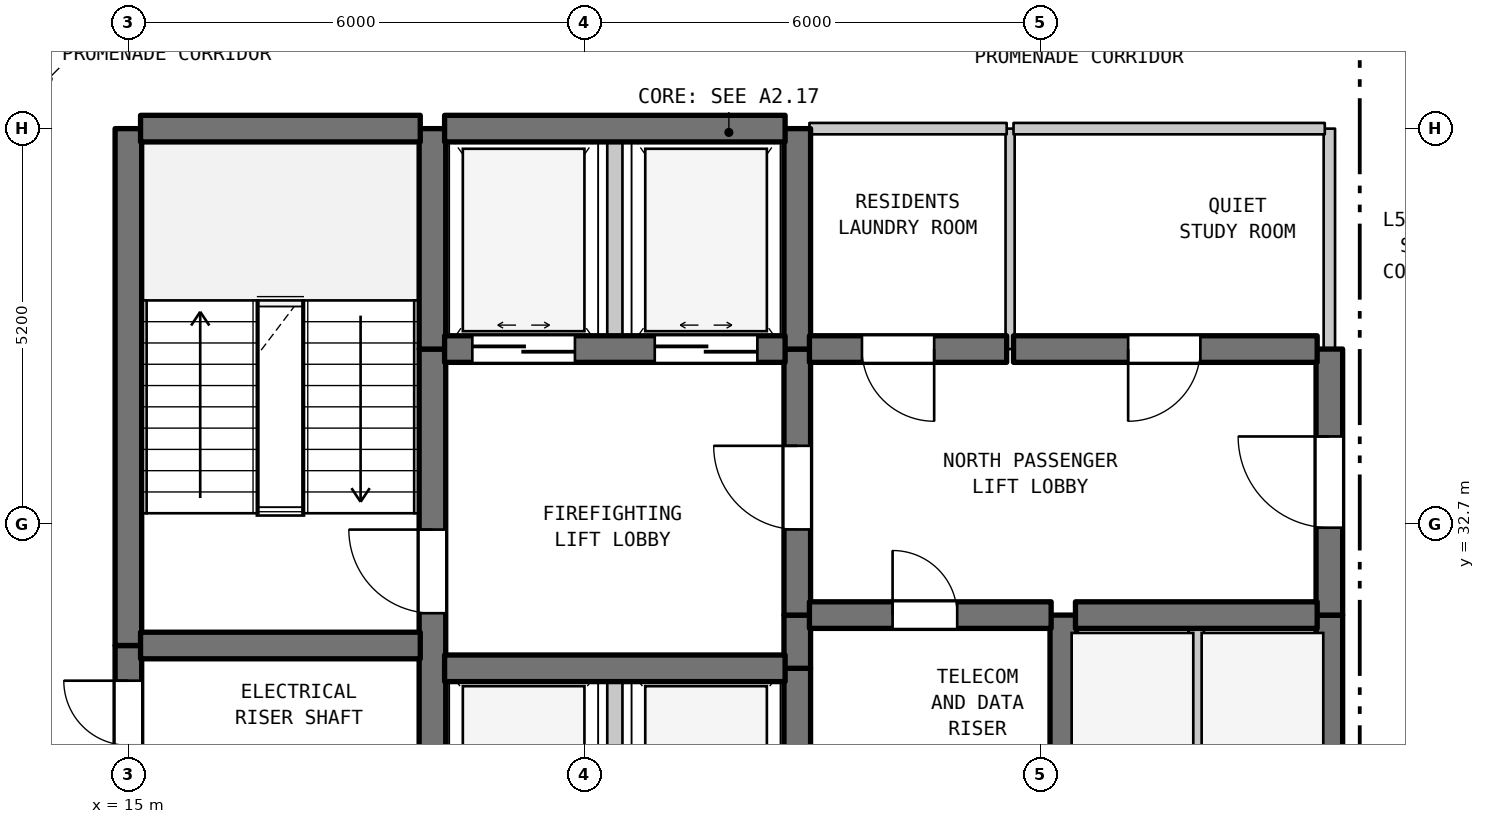
"""IFC4 building model, lengths in metres.
Left out: names, types, materials, properties, quantities, classifications, styles, units other than length and angle.
Written with IfcOpenShell. Run it as: python <this file> out.ifc"""

import sys

from ifc_helpers import new_model, si_unit, direction, frame, frame_2d, origin, place, context, subcontext, project, spatial, rectangle, extrude, element, fill, save


model = new_model("IFC4")
c1 = context("Model", 3, precision=1e-05, world=origin(), true_north=direction((0.0, 1.0)))
c2 = subcontext(c1, "Body", "Model", "MODEL_VIEW")
j1 = project(units=[si_unit("LENGTHUNIT", "METRE"), si_unit("PLANEANGLEUNIT", "RADIAN")], contexts=[c1])
p1 = place(None, origin())
s1 = spatial("IfcSite", under=j1, at=p1, CompositionType="ELEMENT")
p2 = place(p1, origin())
s2 = spatial("IfcBuilding", under=s1, at=p2, CompositionType="ELEMENT")
p3 = place(p2, frame((0.0, 0.0, 214.3)))
s3 = spatial("IfcBuildingStorey", under=s2, at=p3, CompositionType="ELEMENT", Elevation=214.3)
p4 = place(p3, frame((15.0, 29.5, 0.0), z_axis=(0.0, 0.0, 1.0), x_axis=(0.0, 1.0, 0.0)))
e1 = element("IfcWall", 1, at=p4, inside=s3, PredefinedType="SHEAR", context=c2, shape_type="SweptSolid", body=[
    extrude(rectangle(XDim=1.6, YDim=0.35, at=frame_2d((0.8, 0.0))), origin(), (0.0, 0.0, 1.0), 3.38),
])
p5 = place(p4, frame((0.287, 0.0, 0.0)))
e2 = element("IfcOpeningElement", 2, at=p5, cuts=e1, PredefinedType="OPENING", context=c2, shape_type="SweptSolid", body=[
    extrude(rectangle(XDim=0.85, YDim=2.1, at=frame_2d((0.425, 1.05))), frame((0.0, 0.185, 0.0), z_axis=(0.0, -1.0, 0.0), x_axis=(1.0, 0.0, 0.0)), (0.0, 0.0, 1.0), 0.37),
])
p6 = place(p3, frame((15.0, 31.1, 0.0), z_axis=(0.0, 0.0, 1.0), x_axis=(0.0, 1.0, 0.0)))
e3 = element("IfcWall", 3, at=p6, inside=s3, PredefinedType="SHEAR", context=c2, shape_type="SweptSolid", body=[
    extrude(rectangle(XDim=6.8, YDim=0.35, at=frame_2d((3.4, 0.0))), origin(), (0.0, 0.0, 1.0), 3.38),
])
p7 = place(p3, frame((19.0, 29.5, 0.0), z_axis=(0.0, 0.0, 1.0), x_axis=(0.0, 1.0, 0.0)))
e4 = element("IfcWall", 4, at=p7, inside=s3, PredefinedType="SHEAR", context=c2, shape_type="SweptSolid", body=[
    extrude(rectangle(XDim=5.5, YDim=0.35, at=frame_2d((2.75, 0.0))), origin(), (0.0, 0.0, 1.0), 3.38),
])
p8 = place(p7, frame((2.025, 0.0, 0.0)))
e5 = element("IfcOpeningElement", 5, at=p8, cuts=e4, PredefinedType="OPENING", context=c2, shape_type="SweptSolid", body=[
    extrude(rectangle(XDim=1.1, YDim=2.15, at=frame_2d((0.55, 1.075))), frame((0.0, 0.185, 0.0), z_axis=(0.0, -1.0, 0.0), x_axis=(1.0, 0.0, 0.0)), (0.0, 0.0, 1.0), 0.37),
])
p9 = place(p3, frame((19.0, 35.0, 0.0), z_axis=(0.0, 0.0, 1.0), x_axis=(0.0, 1.0, 0.0)))
e6 = element("IfcWall", 6, at=p9, inside=s3, PredefinedType="SHEAR", context=c2, shape_type="SweptSolid", body=[
    extrude(rectangle(XDim=2.9, YDim=0.35, at=frame_2d((1.45, 0.0))), origin(), (0.0, 0.0, 1.0), 3.38),
])
p10 = place(p3, frame((21.4, 28.2, 0.0), z_axis=(0.0, 0.0, 1.0), x_axis=(0.0, 1.0, 0.0)))
e7 = element("IfcWall", 7, at=p10, inside=s3, PredefinedType="STANDARD", context=c2, shape_type="SweptSolid", body=[
    extrude(rectangle(XDim=2.6, YDim=0.2, at=frame_2d((1.3, 0.0))), origin(), (0.0, 0.0, 1.0), 3.38),
])
p11 = place(p3, frame((21.4, 35.0, 0.0), z_axis=(0.0, 0.0, 1.0), x_axis=(0.0, 1.0, 0.0)))
e8 = element("IfcWall", 8, at=p11, inside=s3, PredefinedType="STANDARD", context=c2, shape_type="SweptSolid", body=[
    extrude(rectangle(XDim=2.9, YDim=0.2, at=frame_2d((1.45, 0.0))), origin(), (0.0, 0.0, 1.0), 3.38),
])
p12 = place(p3, frame((23.8, 29.5, 0.0), z_axis=(0.0, 0.0, 1.0), x_axis=(0.0, 1.0, 0.0)))
e9 = element("IfcWall", 9, at=p12, inside=s3, PredefinedType="SHEAR", context=c2, shape_type="SweptSolid", body=[
    extrude(rectangle(XDim=1.3, YDim=0.35, at=frame_2d((0.65, 0.0))), origin(), (0.0, 0.0, 1.0), 3.38),
])
p13 = place(p3, frame((23.8, 30.8, 0.0), z_axis=(0.0, 0.0, 1.0), x_axis=(0.0, 1.0, 0.0)))
e10 = element("IfcWall", 10, at=p13, inside=s3, PredefinedType="SHEAR", context=c2, shape_type="SweptSolid", body=[
    extrude(rectangle(XDim=0.7, YDim=0.35, at=frame_2d((0.35, 0.0))), origin(), (0.0, 0.0, 1.0), 3.38),
])
p14 = place(p3, frame((23.8, 31.5, 0.0), z_axis=(0.0, 0.0, 1.0), x_axis=(0.0, 1.0, 0.0)))
e11 = element("IfcWall", 11, at=p14, inside=s3, PredefinedType="SHEAR", context=c2, shape_type="SweptSolid", body=[
    extrude(rectangle(XDim=3.5, YDim=0.35, at=frame_2d((1.75, 0.0))), origin(), (0.0, 0.0, 1.0), 3.38),
])
p15 = place(p14, frame((1.127, 0.0, 0.0)))
e12 = element("IfcOpeningElement", 12, at=p15, cuts=e11, PredefinedType="OPENING", context=c2, shape_type="SweptSolid", body=[
    extrude(rectangle(XDim=1.1, YDim=2.15, at=frame_2d((0.55, 1.075))), frame((0.0, 0.185, 0.0), z_axis=(0.0, -1.0, 0.0), x_axis=(1.0, 0.0, 0.0)), (0.0, 0.0, 1.0), 0.37),
])
p16 = place(p3, frame((23.8, 35.0, 0.0), z_axis=(0.0, 0.0, 1.0), x_axis=(0.0, 1.0, 0.0)))
e13 = element("IfcWall", 13, at=p16, inside=s3, PredefinedType="SHEAR", context=c2, shape_type="SweptSolid", body=[
    extrude(rectangle(XDim=2.9, YDim=0.35, at=frame_2d((1.45, 0.0))), origin(), (0.0, 0.0, 1.0), 3.38),
])
p17 = place(p3, frame((26.6, 35.0, 0.0), z_axis=(0.0, 0.0, 1.0), x_axis=(0.0, 1.0, 0.0)))
e14 = element("IfcWall", 14, at=p17, inside=s3, PredefinedType="PARTITIONING", context=c2, shape_type="SweptSolid", body=[
    extrude(rectangle(XDim=2.9, YDim=0.12, at=frame_2d((1.45, 0.0))), origin(), (0.0, 0.0, 1.0), 3.38),
])
p18 = place(p3, frame((27.3, 29.5, 0.0), z_axis=(0.0, 0.0, 1.0), x_axis=(0.0, 1.0, 0.0)))
e15 = element("IfcWall", 15, at=p18, inside=s3, PredefinedType="SHEAR", context=c2, shape_type="SweptSolid", body=[
    extrude(rectangle(XDim=2.0, YDim=0.35, at=frame_2d((1.0, 0.0))), origin(), (0.0, 0.0, 1.0), 3.38),
])
p19 = place(p3, frame((29.05, 28.9, 0.0), z_axis=(0.0, 0.0, 1.0), x_axis=(0.0, 1.0, 0.0)))
e16 = element("IfcWall", 16, at=p19, inside=s3, PredefinedType="STANDARD", context=c2, shape_type="SweptSolid", body=[
    extrude(rectangle(XDim=2.6, YDim=0.2, at=frame_2d((1.3, 0.0))), origin(), (0.0, 0.0, 1.0), 3.38),
])
p20 = place(p3, frame((30.8, 28.9, 0.0), z_axis=(0.0, 0.0, 1.0), x_axis=(0.0, 1.0, 0.0)))
e17 = element("IfcWall", 17, at=p20, inside=s3, PredefinedType="SHEAR", context=c2, shape_type="SweptSolid", body=[
    extrude(rectangle(XDim=2.6, YDim=0.35, at=frame_2d((1.3, 0.0))), origin(), (0.0, 0.0, 1.0), 3.38),
])
p21 = place(p3, frame((30.8, 31.5, 0.0), z_axis=(0.0, 0.0, 1.0), x_axis=(0.0, 1.0, 0.0)))
e18 = element("IfcWall", 18, at=p21, inside=s3, PredefinedType="SHEAR", context=c2, shape_type="SweptSolid", body=[
    extrude(rectangle(XDim=3.5, YDim=0.35, at=frame_2d((1.75, 0.0))), origin(), (0.0, 0.0, 1.0), 3.38),
])
p22 = place(p21, frame((1.15, 0.0, 0.0)))
e19 = element("IfcOpeningElement", 19, at=p22, cuts=e18, PredefinedType="OPENING", context=c2, shape_type="SweptSolid", body=[
    extrude(rectangle(XDim=1.2, YDim=2.2, at=frame_2d((0.6, 1.1))), frame((0.0, 0.185, 0.0), z_axis=(0.0, -1.0, 0.0), x_axis=(1.0, 0.0, 0.0)), (0.0, 0.0, 1.0), 0.37),
])
p23 = place(p3, frame((30.8, 35.0, 0.0), z_axis=(0.0, 0.0, 1.0), x_axis=(0.0, 1.0, 0.0)))
e20 = element("IfcWall", 20, at=p23, inside=s3, PredefinedType="STANDARD", context=c2, shape_type="SweptSolid", body=[
    extrude(rectangle(XDim=2.9, YDim=0.15, at=frame_2d((1.45, 0.0))), origin(), (0.0, 0.0, 1.0), 3.38),
])
p24 = place(p3, frame((19.16, 30.8, 0.0), z_axis=(0.0, 0.0, 1.0), x_axis=(1.0, 0.0, 0.0)))
e21 = element("IfcWall", 21, at=p24, inside=s3, PredefinedType="SHEAR", context=c2, shape_type="SweptSolid", body=[
    extrude(rectangle(XDim=4.48, YDim=0.35, at=frame_2d((2.24, 0.0))), origin(), (0.0, 0.0, 1.0), 3.38),
])
p25 = place(p3, frame((15.16, 31.1, 0.0), z_axis=(0.0, 0.0, 1.0), x_axis=(1.0, 0.0, 0.0)))
e22 = element("IfcWall", 22, at=p25, inside=s3, PredefinedType="SHEAR", context=c2, shape_type="SweptSolid", body=[
    extrude(rectangle(XDim=3.68, YDim=0.35, at=frame_2d((1.84, 0.0))), origin(), (0.0, 0.0, 1.0), 3.38),
])
p26 = place(p3, frame((23.96, 31.5, 0.0), z_axis=(0.0, 0.0, 1.0), x_axis=(1.0, 0.0, 0.0)))
e23 = element("IfcWall", 23, at=p26, inside=s3, PredefinedType="SHEAR", context=c2, shape_type="SweptSolid", body=[
    extrude(rectangle(XDim=3.18, YDim=0.35, at=frame_2d((1.59, 0.0))), origin(), (0.0, 0.0, 1.0), 3.38),
])
p27 = place(p26, frame((1.094, 0.0, 0.0)))
e24 = element("IfcOpeningElement", 24, at=p27, cuts=e23, PredefinedType="OPENING", context=c2, shape_type="SweptSolid", body=[
    extrude(rectangle(XDim=0.85, YDim=2.1, at=frame_2d((0.425, 1.05))), frame((0.0, 0.185, 0.0), z_axis=(0.0, -1.0, 0.0), x_axis=(1.0, 0.0, 0.0)), (0.0, 0.0, 1.0), 0.37),
])
p28 = place(p3, frame((27.46, 31.5, 0.0), z_axis=(0.0, 0.0, 1.0), x_axis=(1.0, 0.0, 0.0)))
e25 = element("IfcWall", 25, at=p28, inside=s3, PredefinedType="SHEAR", context=c2, shape_type="SweptSolid", body=[
    extrude(rectangle(XDim=3.18, YDim=0.35, at=frame_2d((1.59, 0.0))), origin(), (0.0, 0.0, 1.0), 3.38),
])
p29 = place(p3, frame((19.16, 35.0, 0.0), z_axis=(0.0, 0.0, 1.0), x_axis=(1.0, 0.0, 0.0)))
e26 = element("IfcWall", 26, at=p29, inside=s3, PredefinedType="SHEAR", context=c2, shape_type="SweptSolid", body=[
    extrude(rectangle(XDim=4.48, YDim=0.35, at=frame_2d((2.24, 0.0))), origin(), (0.0, 0.0, 1.0), 3.38),
])
p30 = place(p29, frame((0.365, 0.0, 0.0)))
e27 = element("IfcOpeningElement", 27, at=p30, cuts=e26, PredefinedType="OPENING", context=c2, shape_type="SweptSolid", body=[
    extrude(rectangle(XDim=1.35, YDim=2.2, at=frame_2d((0.675, 1.1))), frame((0.0, 0.185, 0.0), z_axis=(0.0, -1.0, 0.0), x_axis=(1.0, 0.0, 0.0)), (0.0, 0.0, 1.0), 0.37),
])
p31 = place(p29, frame((2.765, 0.0, 0.0)))
e28 = element("IfcOpeningElement", 28, at=p31, cuts=e26, PredefinedType="OPENING", context=c2, shape_type="SweptSolid", body=[
    extrude(rectangle(XDim=1.35, YDim=2.2, at=frame_2d((0.675, 1.1))), frame((0.0, 0.185, 0.0), z_axis=(0.0, -1.0, 0.0), x_axis=(1.0, 0.0, 0.0)), (0.0, 0.0, 1.0), 0.37),
])
p32 = place(p3, frame((23.96, 35.0, 0.0), z_axis=(0.0, 0.0, 1.0), x_axis=(1.0, 0.0, 0.0)))
e29 = element("IfcWall", 29, at=p32, inside=s3, PredefinedType="SHEAR", context=c2, shape_type="SweptSolid", body=[
    extrude(rectangle(XDim=2.595, YDim=0.35, at=frame_2d((1.297, 0.0))), origin(), (0.0, 0.0, 1.0), 3.38),
])
p33 = place(p32, frame((0.691, 0.0, 0.0)))
e30 = element("IfcOpeningElement", 30, at=p33, cuts=e29, PredefinedType="OPENING", context=c2, shape_type="SweptSolid", body=[
    extrude(rectangle(XDim=0.95, YDim=2.15, at=frame_2d((0.475, 1.075))), frame((0.0, 0.185, 0.0), z_axis=(0.0, -1.0, 0.0), x_axis=(1.0, 0.0, 0.0)), (0.0, 0.0, 1.0), 0.37),
])
p34 = place(p3, frame((26.645, 35.0, 0.0), z_axis=(0.0, 0.0, 1.0), x_axis=(1.0, 0.0, 0.0)))
e31 = element("IfcWall", 31, at=p34, inside=s3, PredefinedType="SHEAR", context=c2, shape_type="SweptSolid", body=[
    extrude(rectangle(XDim=3.995, YDim=0.35, at=frame_2d((1.998, 0.0))), origin(), (0.0, 0.0, 1.0), 3.38),
])
p35 = place(p34, frame((1.508, 0.0, 0.0)))
e32 = element("IfcOpeningElement", 32, at=p35, cuts=e31, PredefinedType="OPENING", context=c2, shape_type="SweptSolid", body=[
    extrude(rectangle(XDim=0.95, YDim=2.15, at=frame_2d((0.475, 1.075))), frame((0.0, 0.185, 0.0), z_axis=(0.0, -1.0, 0.0), x_axis=(1.0, 0.0, 0.0)), (0.0, 0.0, 1.0), 0.37),
])
p36 = place(p3, frame((15.16, 37.9, 0.0), z_axis=(0.0, 0.0, 1.0), x_axis=(1.0, 0.0, 0.0)))
e33 = element("IfcWall", 33, at=p36, inside=s3, PredefinedType="SHEAR", context=c2, shape_type="SweptSolid", body=[
    extrude(rectangle(XDim=3.68, YDim=0.35, at=frame_2d((1.84, 0.0))), origin(), (0.0, 0.0, 1.0), 3.38),
])
p37 = place(p3, frame((19.16, 37.9, 0.0), z_axis=(0.0, 0.0, 1.0), x_axis=(1.0, 0.0, 0.0)))
e34 = element("IfcWall", 34, at=p37, inside=s3, PredefinedType="SHEAR", context=c2, shape_type="SweptSolid", body=[
    extrude(rectangle(XDim=4.48, YDim=0.35, at=frame_2d((2.24, 0.0))), origin(), (0.0, 0.0, 1.0), 3.38),
])
p38 = place(p3, frame((23.96, 37.9, 0.0), z_axis=(0.0, 0.0, 1.0), x_axis=(1.0, 0.0, 0.0)))
e35 = element("IfcWall", 35, at=p38, inside=s3, PredefinedType="STANDARD", context=c2, shape_type="SweptSolid", body=[
    extrude(rectangle(XDim=2.595, YDim=0.15, at=frame_2d((1.297, 0.0))), origin(), (0.0, 0.0, 1.0), 2.88),
])
p39 = place(p3, frame((26.645, 37.9, 0.0), z_axis=(0.0, 0.0, 1.0), x_axis=(1.0, 0.0, 0.0)))
e36 = element("IfcWall", 36, at=p39, inside=s3, PredefinedType="STANDARD", context=c2, shape_type="SweptSolid", body=[
    extrude(rectangle(XDim=4.095, YDim=0.15, at=frame_2d((2.047, 0.0))), origin(), (0.0, 0.0, 1.0), 2.88),
])
p40 = place(p5, origin())
e37 = element("IfcDoor", 37, at=p40, inside=s3, OperationType="SINGLE_SWING_RIGHT", PredefinedType="DOOR", context=c2, shape_type="SweptSolid", body=[
    extrude(rectangle(XDim=0.85, YDim=2.1, at=frame_2d((0.425, 1.05))), frame((0.0, 0.025, 0.0), z_axis=(0.0, -1.0, 0.0), x_axis=(1.0, 0.0, 0.0)), (0.0, 0.0, 1.0), 0.05),
])
fill(e2, e37)
p41 = place(p8, origin())
e38 = element("IfcDoor", 38, at=p41, inside=s3, OperationType="SINGLE_SWING_RIGHT", PredefinedType="DOOR", context=c2, shape_type="SweptSolid", body=[
    extrude(rectangle(XDim=1.1, YDim=2.15, at=frame_2d((0.55, 1.075))), frame((0.0, 0.025, 0.0), z_axis=(0.0, -1.0, 0.0), x_axis=(1.0, 0.0, 0.0)), (0.0, 0.0, 1.0), 0.05),
])
fill(e5, e38)
p42 = place(p15, origin())
e39 = element("IfcDoor", 39, at=p42, inside=s3, OperationType="SINGLE_SWING_RIGHT", PredefinedType="DOOR", context=c2, shape_type="SweptSolid", body=[
    extrude(rectangle(XDim=1.1, YDim=2.15, at=frame_2d((0.55, 1.075))), frame((0.0, 0.025, 0.0), z_axis=(0.0, -1.0, 0.0), x_axis=(1.0, 0.0, 0.0)), (0.0, 0.0, 1.0), 0.05),
])
fill(e12, e39)
p43 = place(p22, origin())
e40 = element("IfcDoor", 40, at=p43, inside=s3, OperationType="SINGLE_SWING_RIGHT", PredefinedType="DOOR", context=c2, shape_type="SweptSolid", body=[
    extrude(rectangle(XDim=1.2, YDim=2.2, at=frame_2d((0.6, 1.1))), frame((0.0, 0.025, 0.0), z_axis=(0.0, -1.0, 0.0), x_axis=(1.0, 0.0, 0.0)), (0.0, 0.0, 1.0), 0.05),
])
fill(e19, e40)
p44 = place(p27, origin())
e41 = element("IfcDoor", 41, at=p44, inside=s3, OperationType="SINGLE_SWING_LEFT", PredefinedType="DOOR", context=c2, shape_type="SweptSolid", body=[
    extrude(rectangle(XDim=0.85, YDim=2.1, at=frame_2d((0.425, 1.05))), frame((0.0, 0.025, 0.0), z_axis=(0.0, -1.0, 0.0), x_axis=(1.0, 0.0, 0.0)), (0.0, 0.0, 1.0), 0.05),
])
fill(e24, e41)
p45 = place(p30, origin())
e42 = element("IfcDoor", 42, at=p45, inside=s3, OperationType="DOUBLE_DOOR_SLIDING", PredefinedType="DOOR", context=c2, shape_type="SweptSolid", body=[
    extrude(rectangle(XDim=1.35, YDim=2.2, at=frame_2d((0.675, 1.1))), frame((0.0, 0.025, 0.0), z_axis=(0.0, -1.0, 0.0), x_axis=(1.0, 0.0, 0.0)), (0.0, 0.0, 1.0), 0.05),
])
fill(e27, e42)
p46 = place(p31, origin())
e43 = element("IfcDoor", 43, at=p46, inside=s3, OperationType="DOUBLE_DOOR_SLIDING", PredefinedType="DOOR", context=c2, shape_type="SweptSolid", body=[
    extrude(rectangle(XDim=1.35, YDim=2.2, at=frame_2d((0.675, 1.1))), frame((0.0, 0.025, 0.0), z_axis=(0.0, -1.0, 0.0), x_axis=(1.0, 0.0, 0.0)), (0.0, 0.0, 1.0), 0.05),
])
fill(e28, e43)
p47 = place(p33, frame((0.95, 0.0, 0.0), z_axis=(0.0, 0.0, 1.0), x_axis=(-1.0, 0.0, 0.0)))
e44 = element("IfcDoor", 44, at=p47, inside=s3, OperationType="SINGLE_SWING_RIGHT", PredefinedType="DOOR", context=c2, shape_type="SweptSolid", body=[
    extrude(rectangle(XDim=0.95, YDim=2.15, at=frame_2d((0.475, 1.075))), frame((0.0, 0.025, 0.0), z_axis=(0.0, -1.0, 0.0), x_axis=(1.0, 0.0, 0.0)), (0.0, 0.0, 1.0), 0.05),
])
fill(e30, e44)
p48 = place(p35, frame((0.95, 0.0, 0.0), z_axis=(0.0, 0.0, 1.0), x_axis=(-1.0, 0.0, 0.0)))
e45 = element("IfcDoor", 45, at=p48, inside=s3, OperationType="SINGLE_SWING_LEFT", PredefinedType="DOOR", context=c2, shape_type="SweptSolid", body=[
    extrude(rectangle(XDim=0.95, YDim=2.15, at=frame_2d((0.475, 1.075))), frame((0.0, 0.025, 0.0), z_axis=(0.0, -1.0, 0.0), x_axis=(1.0, 0.0, 0.0)), (0.0, 0.0, 1.0), 0.05),
])
fill(e32, e45)
save(model, sys.argv[1])
